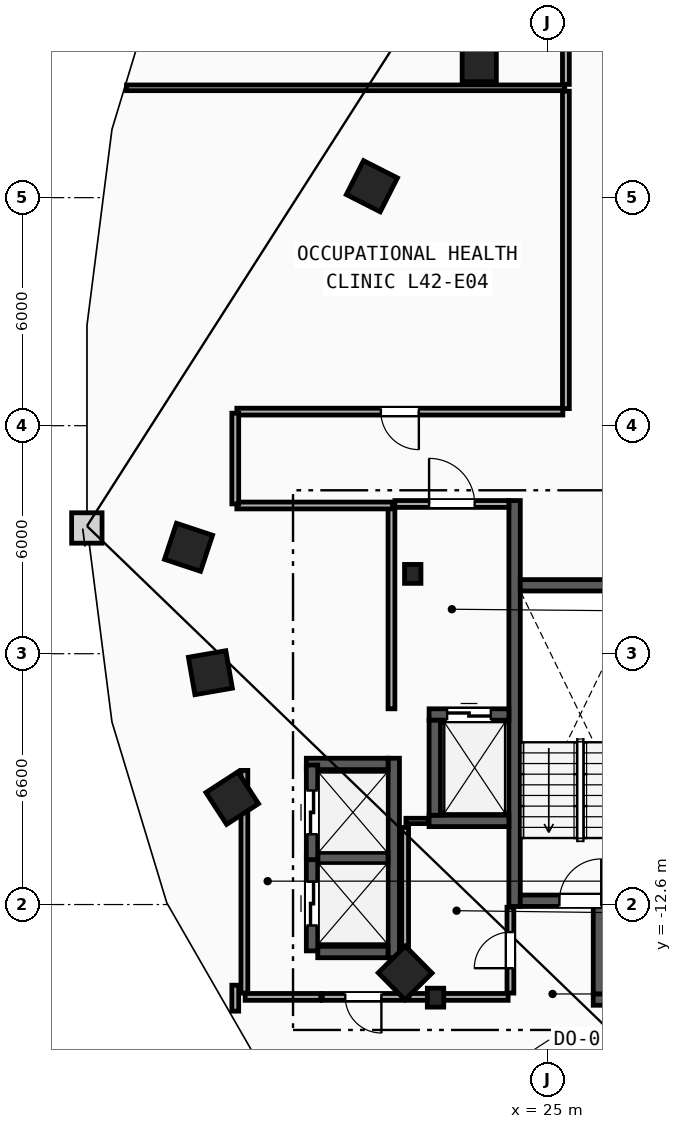
"""IFC4 building model, lengths in metres.
Left out: names, types, materials, properties, quantities, classifications, styles, units other than length and angle.
Written with IfcOpenShell. Run it as: python <this file> out.ifc"""

import sys

from ifc_helpers import new_model, si_unit, direction, frame, frame_2d, origin, origin_2d, place, context, subcontext, project, spatial, rectangle, i_section, extrude, element, fill, save


model = new_model("IFC4")
c1 = context("Model", 3, precision=1e-05, world=origin(), true_north=direction((0.0, 1.0)))
c2 = subcontext(c1, "Body", "Model", "MODEL_VIEW")
j1 = project(units=[si_unit("LENGTHUNIT", "METRE"), si_unit("PLANEANGLEUNIT", "RADIAN")], contexts=[c1])
p1 = place(None, origin())
s1 = spatial("IfcSite", under=j1, at=p1, CompositionType="ELEMENT")
p2 = place(p1, origin())
s2 = spatial("IfcBuilding", under=s1, at=p2, CompositionType="ELEMENT")
p3 = place(p2, frame((0.0, 0.0, 162.0)))
s3 = spatial("IfcBuildingStorey", under=s2, at=p3, CompositionType="ELEMENT", Elevation=162.0)
for number, where, z_axis, x_axis in (
    (1, (21.45, -3.9, 0.0), (0.0, 0.0, 1.0), (1.0, 0.0, 0.0)),
    (2, (22.05, -15.05, 0.0), (0.0, 0.0, 1.0), (1.0, 0.0, 0.0)),
):
    element("IfcColumn", number, at=place(p3, frame(where, z_axis=z_axis, x_axis=x_axis)), inside=s3, PredefinedType="COLUMN", context=c2, shape_type="SweptSolid", body=[
        extrude(i_section(OverallWidth=0.432, OverallDepth=0.498, WebThickness=0.056, FlangeThickness=0.089, FilletRadius=0.018, at=origin_2d()), origin(), (0.0, 0.0, 1.0), 3.6),
    ])
p4 = place(p3, frame((23.2, 9.5, 0.0), z_axis=(0.0, 0.0, 1.0), x_axis=(1.0, 0.0, 0.0)))
e3 = element("IfcColumn", 3, at=p4, inside=s3, PredefinedType="COLUMN", context=c2, shape_type="SweptSolid", body=[
    extrude(rectangle(XDim=0.9, YDim=0.9, at=origin_2d()), origin(), (0.0, 0.0, 1.0), 3.6),
])
for number, where, z_axis, x_axis in (
    (4, (15.55, -3.2, 0.0), (0.0, 0.0, 1.0), (-0.315, -0.949, 0.0)),
    (5, (16.125, -6.5, 0.0), (0.0, 0.0, 1.0), (0.172, -0.985, 0.0)),
    (6, (16.7, -9.8, 0.0), (0.0, 0.0, 1.0), (0.544, -0.839, 0.0)),
    (7, (21.25, -14.4, 0.0), (0.0, 0.0, 1.0), (0.703, -0.711, 0.0)),
    (8, (20.375, 6.3, 0.0), (0.0, 0.0, 1.0), (-0.453, -0.892, 0.0)),
):
    element("IfcColumn", number, at=place(p3, frame(where, z_axis=z_axis, x_axis=x_axis)), inside=s3, PredefinedType="COLUMN", context=c2, shape_type="SweptSolid", body=[
        extrude(rectangle(XDim=1.0, YDim=1.0, at=origin_2d()), origin(), (0.0, 0.0, 1.0), 3.6),
    ])
p5 = place(p3, frame((24.13, -12.65, 0.0), z_axis=(0.0, 0.0, 1.0), x_axis=(0.0, 1.0, 0.0)))
e9 = element("IfcWall", 9, at=p5, inside=s3, PredefinedType="SHEAR", context=c2, shape_type="SweptSolid", body=[
    extrude(rectangle(XDim=10.68, YDim=0.3, at=frame_2d((5.34, 0.0))), origin(), (0.0, 0.0, 1.0), 3.36),
])
p6 = place(p3, frame((24.28, -12.5, 0.0), z_axis=(0.0, 0.0, 1.0), x_axis=(1.0, 0.0, 0.0)))
e10 = element("IfcWall", 10, at=p6, inside=s3, PredefinedType="SHEAR", context=c2, shape_type="SweptSolid", body=[
    extrude(rectangle(XDim=3.16, YDim=0.3, at=frame_2d((1.58, 0.0))), origin(), (0.0, 0.0, 1.0), 3.36),
])
p7 = place(p6, frame((1.03, 0.0, 0.0)))
e11 = element("IfcOpeningElement", 11, at=p7, cuts=e10, PredefinedType="OPENING", context=c2, shape_type="SweptSolid", body=[
    extrude(rectangle(XDim=1.1, YDim=2.15, at=frame_2d((0.55, 1.075))), frame((0.0, 0.16, 0.0), z_axis=(0.0, -1.0, 0.0), x_axis=(1.0, 0.0, 0.0)), (0.0, 0.0, 1.0), 0.32),
])
p8 = place(p3, frame((24.28, -4.2, 0.0), z_axis=(0.0, 0.0, 1.0), x_axis=(1.0, 0.0, 0.0)))
e12 = element("IfcWall", 12, at=p8, inside=s3, PredefinedType="SHEAR", context=c2, shape_type="SweptSolid", body=[
    extrude(rectangle(XDim=3.16, YDim=0.3, at=frame_2d((1.58, 0.0))), origin(), (0.0, 0.0, 1.0), 3.36),
])
p9 = place(p3, frame((20.89, -7.45, 0.0), z_axis=(0.0, 0.0, 1.0), x_axis=(0.0, 1.0, 0.0)))
e13 = element("IfcWall", 13, at=p9, inside=s3, PredefinedType="PARTITIONING", context=c2, shape_type="SweptSolid", body=[
    extrude(rectangle(XDim=5.3, YDim=0.18, at=frame_2d((2.65, 0.0))), origin(), (0.0, 0.0, 1.0), 3.36),
])
p10 = place(p3, frame((20.98, -2.06, 0.0), z_axis=(0.0, 0.0, 1.0), x_axis=(1.0, 0.0, 0.0)))
e14 = element("IfcWall", 14, at=p10, inside=s3, PredefinedType="PARTITIONING", context=c2, shape_type="SweptSolid", body=[
    extrude(rectangle(XDim=3.0, YDim=0.18, at=frame_2d((1.5, 0.0))), origin(), (0.0, 0.0, 1.0), 3.36),
])
p11 = place(p10, frame((0.9, 0.0, 0.0)))
e15 = element("IfcOpeningElement", 15, at=p11, cuts=e14, PredefinedType="OPENING", context=c2, shape_type="SweptSolid", body=[
    extrude(rectangle(XDim=1.2, YDim=2.15, at=frame_2d((0.6, 1.075))), frame((0.0, 0.1, 0.0), z_axis=(0.0, -1.0, 0.0), x_axis=(1.0, 0.0, 0.0)), (0.0, 0.0, 1.0), 0.2),
])
p12 = place(p3, frame((21.88, -7.6, 0.0), z_axis=(0.0, 0.0, 1.0), x_axis=(1.0, 0.0, 0.0)))
e16 = element("IfcWall", 16, at=p12, inside=s3, PredefinedType="SHEAR", context=c2, shape_type="SweptSolid", body=[
    extrude(rectangle(XDim=2.1, YDim=0.3, at=frame_2d((1.05, 0.0))), origin(), (0.0, 0.0, 1.0), 3.36),
])
p13 = place(p12, frame((0.475, 0.0, 0.0)))
e17 = element("IfcOpeningElement", 17, at=p13, cuts=e16, PredefinedType="OPENING", context=c2, shape_type="SweptSolid", body=[
    extrude(rectangle(XDim=1.15, YDim=2.2, at=frame_2d((0.575, 1.1))), frame((0.0, 0.16, 0.0), z_axis=(0.0, -1.0, 0.0), x_axis=(1.0, 0.0, 0.0)), (0.0, 0.0, 1.0), 0.32),
])
p14 = place(p3, frame((21.88, -10.4, 0.0), z_axis=(0.0, 0.0, 1.0), x_axis=(1.0, 0.0, 0.0)))
e18 = element("IfcWall", 18, at=p14, inside=s3, PredefinedType="SHEAR", context=c2, shape_type="SweptSolid", body=[
    extrude(rectangle(XDim=2.1, YDim=0.3, at=frame_2d((1.05, 0.0))), origin(), (0.0, 0.0, 1.0), 3.36),
])
for number, where, z_axis, x_axis in (
    (19, (22.03, -10.25, 0.0), (0.0, 0.0, 1.0), (0.0, 1.0, 0.0)),
    (20, (26.2, -15.1, 0.0), (0.0, 0.0, 1.0), (1.0, 0.0, 0.0)),
):
    element("IfcWall", number, at=place(p3, frame(where, z_axis=z_axis, x_axis=x_axis)), inside=s3, PredefinedType="SHEAR", context=c2, shape_type="SweptSolid", body=[
        extrude(rectangle(XDim=2.5, YDim=0.3, at=frame_2d((1.25, 0.0))), origin(), (0.0, 0.0, 1.0), 3.36),
    ])
p15 = place(p3, frame((26.35, -14.95, 0.0), z_axis=(0.0, 0.0, 1.0), x_axis=(0.0, 1.0, 0.0)))
e21 = element("IfcWall", 21, at=p15, inside=s3, PredefinedType="SHEAR", context=c2, shape_type="SweptSolid", body=[
    extrude(rectangle(XDim=2.3, YDim=0.3, at=frame_2d((1.15, 0.0))), origin(), (0.0, 0.0, 1.0), 3.36),
])
p16 = place(p3, frame((20.95, -14.0, 0.0), z_axis=(0.0, 0.0, 1.0), x_axis=(0.0, 1.0, 0.0)))
e22 = element("IfcWall", 22, at=p16, inside=s3, PredefinedType="SHEAR", context=c2, shape_type="SweptSolid", body=[
    extrude(rectangle(XDim=5.25, YDim=0.3, at=frame_2d((2.625, 0.0))), origin(), (0.0, 0.0, 1.0), 3.36),
])
p17 = place(p3, frame((18.95, -13.85, 0.0), z_axis=(0.0, 0.0, 1.0), x_axis=(1.0, 0.0, 0.0)))
e23 = element("IfcWall", 23, at=p17, inside=s3, PredefinedType="SHEAR", context=c2, shape_type="SweptSolid", body=[
    extrude(rectangle(XDim=1.85, YDim=0.3, at=frame_2d((0.925, 0.0))), origin(), (0.0, 0.0, 1.0), 3.36),
])
p18 = place(p3, frame((18.65, -8.9, 0.0), z_axis=(0.0, 0.0, 1.0), x_axis=(1.0, 0.0, 0.0)))
e24 = element("IfcWall", 24, at=p18, inside=s3, PredefinedType="SHEAR", context=c2, shape_type="SweptSolid", body=[
    extrude(rectangle(XDim=2.15, YDim=0.3, at=frame_2d((1.075, 0.0))), origin(), (0.0, 0.0, 1.0), 3.36),
])
p19 = place(p3, frame((18.95, -11.375, 0.0), z_axis=(0.0, 0.0, 1.0), x_axis=(1.0, 0.0, 0.0)))
e25 = element("IfcWall", 25, at=p19, inside=s3, PredefinedType="SHEAR", context=c2, shape_type="SweptSolid", body=[
    extrude(rectangle(XDim=1.85, YDim=0.3, at=frame_2d((0.925, 0.0))), origin(), (0.0, 0.0, 1.0), 3.36),
])
p20 = place(p3, frame((18.8, -13.82, 0.0), z_axis=(0.0, 0.0, 1.0), x_axis=(0.0, 1.0, 0.0)))
e26 = element("IfcWall", 26, at=p20, inside=s3, PredefinedType="SHEAR", context=c2, shape_type="SweptSolid", body=[
    extrude(rectangle(XDim=2.49, YDim=0.3, at=frame_2d((1.245, 0.0))), origin(), (0.0, 0.0, 1.0), 3.36),
])
p21 = place(p20, frame((0.67, 0.0, 0.0)))
e27 = element("IfcOpeningElement", 27, at=p21, cuts=e26, PredefinedType="OPENING", context=c2, shape_type="SweptSolid", body=[
    extrude(rectangle(XDim=1.15, YDim=2.2, at=frame_2d((0.575, 1.1))), frame((0.0, 0.16, 0.0), z_axis=(0.0, -1.0, 0.0), x_axis=(1.0, 0.0, 0.0)), (0.0, 0.0, 1.0), 0.32),
])
p22 = place(p3, frame((18.8, -11.42, 0.0), z_axis=(0.0, 0.0, 1.0), x_axis=(0.0, 1.0, 0.0)))
e28 = element("IfcWall", 28, at=p22, inside=s3, PredefinedType="SHEAR", context=c2, shape_type="SweptSolid", body=[
    extrude(rectangle(XDim=2.49, YDim=0.3, at=frame_2d((1.245, 0.0))), origin(), (0.0, 0.0, 1.0), 3.36),
])
p23 = place(p22, frame((0.67, 0.0, 0.0)))
e29 = element("IfcOpeningElement", 29, at=p23, cuts=e28, PredefinedType="OPENING", context=c2, shape_type="SweptSolid", body=[
    extrude(rectangle(XDim=1.15, YDim=2.2, at=frame_2d((0.575, 1.1))), frame((0.0, 0.16, 0.0), z_axis=(0.0, -1.0, 0.0), x_axis=(1.0, 0.0, 0.0)), (0.0, 0.0, 1.0), 0.32),
])
p24 = place(p3, frame((17.02, -14.93, 0.0), z_axis=(0.0, 0.0, 1.0), x_axis=(0.0, 1.0, 0.0)))
e30 = element("IfcWall", 30, at=p24, inside=s3, PredefinedType="PARTITIONING", context=c2, shape_type="SweptSolid", body=[
    extrude(rectangle(XDim=5.86, YDim=0.18, at=frame_2d((2.93, 0.0))), origin(), (0.0, 0.0, 1.0), 3.36),
])
p25 = place(p3, frame((17.04, -15.03, 0.0), z_axis=(0.0, 0.0, 1.0), x_axis=(1.0, 0.0, 0.0)))
e31 = element("IfcWall", 31, at=p25, inside=s3, PredefinedType="PARTITIONING", context=c2, shape_type="SweptSolid", body=[
    extrude(rectangle(XDim=1.99, YDim=0.18, at=frame_2d((0.995, 0.0))), origin(), (0.0, 0.0, 1.0), 3.36),
])
p26 = place(p3, frame((21.23, -15.03, 0.0), z_axis=(0.0, 0.0, 1.0), x_axis=(-1.0, 0.0, 0.0)))
e32 = element("IfcWall", 32, at=p26, inside=s3, PredefinedType="PARTITIONING", context=c2, shape_type="SweptSolid", body=[
    extrude(rectangle(XDim=2.16, YDim=0.18, at=frame_2d((1.08, 0.0))), origin(), (0.0, 0.0, 1.0), 3.36),
])
p27 = place(p26, frame((0.605, 0.0, 0.0)))
e33 = element("IfcOpeningElement", 33, at=p27, cuts=e32, PredefinedType="OPENING", context=c2, shape_type="SweptSolid", body=[
    extrude(rectangle(XDim=0.95, YDim=2.1, at=frame_2d((0.475, 1.05))), frame((0.0, 0.1, 0.0), z_axis=(0.0, -1.0, 0.0), x_axis=(1.0, 0.0, 0.0)), (0.0, 0.0, 1.0), 0.2),
])
p28 = place(p3, frame((21.27, -10.4, 0.0), z_axis=(0.0, 0.0, 1.0), x_axis=(1.0, 0.0, 0.0)))
e34 = element("IfcWall", 34, at=p28, inside=s3, PredefinedType="PARTITIONING", context=c2, shape_type="SweptSolid", body=[
    extrude(rectangle(XDim=0.59, YDim=0.14, at=frame_2d((0.295, 0.0))), origin(), (0.0, 0.0, 1.0), 3.36),
])
p29 = place(p3, frame((21.25, -14.93, 0.0), z_axis=(0.0, 0.0, 1.0), x_axis=(0.0, 1.0, 0.0)))
e35 = element("IfcWall", 35, at=p29, inside=s3, PredefinedType="PARTITIONING", context=c2, shape_type="SweptSolid", body=[
    extrude(rectangle(XDim=4.36, YDim=0.18, at=frame_2d((2.18, 0.0))), origin(), (0.0, 0.0, 1.0), 3.36),
])
p30 = place(p3, frame((21.35, -15.03, 0.0), z_axis=(0.0, 0.0, 1.0), x_axis=(1.0, 0.0, 0.0)))
e36 = element("IfcWall", 36, at=p30, inside=s3, PredefinedType="PARTITIONING", context=c2, shape_type="SweptSolid", body=[
    extrude(rectangle(XDim=2.61, YDim=0.18, at=frame_2d((1.305, 0.0))), origin(), (0.0, 0.0, 1.0), 2.433),
])
p31 = place(p3, frame((24.02, -14.93, 0.0), z_axis=(0.0, 0.0, 1.0), x_axis=(0.0, 1.0, 0.0)))
e37 = element("IfcWall", 37, at=p31, inside=s3, PredefinedType="PARTITIONING", context=c2, shape_type="SweptSolid", body=[
    extrude(rectangle(XDim=2.26, YDim=0.18, at=frame_2d((1.13, 0.0))), origin(), (0.0, 0.0, 1.0), 3.36),
])
p32 = place(p31, frame((0.655, 0.0, 0.0)))
e38 = element("IfcOpeningElement", 38, at=p32, cuts=e37, PredefinedType="OPENING", context=c2, shape_type="SweptSolid", body=[
    extrude(rectangle(XDim=0.95, YDim=2.1, at=frame_2d((0.475, 1.05))), frame((0.0, 0.1, 0.0), z_axis=(0.0, -1.0, 0.0), x_axis=(1.0, 0.0, 0.0)), (0.0, 0.0, 1.0), 0.2),
])
p33 = place(p3, frame((13.918, 8.89, 0.0), z_axis=(0.0, 0.0, 1.0), x_axis=(1.0, 0.0, 0.0)))
e39 = element("IfcWall", 39, at=p33, inside=s3, PredefinedType="PARTITIONING", context=c2, shape_type="SweptSolid", body=[
    extrude(rectangle(XDim=11.532, YDim=0.15, at=frame_2d((5.766, 0.0))), origin(), (0.0, 0.0, 1.0), 3.36),
])
p34 = place(p3, frame((25.4, 0.37, 0.0), z_axis=(0.0, 0.0, 1.0), x_axis=(-1.0, 0.0, 0.0)))
e40 = element("IfcWall", 40, at=p34, inside=s3, PredefinedType="PARTITIONING", context=c2, shape_type="SweptSolid", body=[
    extrude(rectangle(XDim=8.578, YDim=0.18, at=frame_2d((4.289, 0.0))), origin(), (0.0, 0.0, 1.0), 3.36),
])
p35 = place(p34, frame((3.789, 0.0, 0.0)))
e41 = element("IfcOpeningElement", 41, at=p35, cuts=e40, PredefinedType="OPENING", context=c2, shape_type="SweptSolid", body=[
    extrude(rectangle(XDim=1.0, YDim=2.15, at=frame_2d((0.5, 1.075))), frame((0.0, 0.1, 0.0), z_axis=(0.0, -1.0, 0.0), x_axis=(1.0, 0.0, 0.0)), (0.0, 0.0, 1.0), 0.2),
])
p36 = place(p3, frame((25.48, 8.8, 0.0), z_axis=(0.0, 0.0, 1.0), x_axis=(0.0, -1.0, 0.0)))
e42 = element("IfcWall", 42, at=p36, inside=s3, PredefinedType="PARTITIONING", context=c2, shape_type="SweptSolid", body=[
    extrude(rectangle(XDim=8.35, YDim=0.18, at=frame_2d((4.175, 0.0))), origin(), (0.0, 0.0, 1.0), 3.36),
])
p37 = place(p3, frame((16.822, -2.1, 0.0), z_axis=(0.0, 0.0, 1.0), x_axis=(1.0, 0.0, 0.0)))
e43 = element("IfcWall", 43, at=p37, inside=s3, PredefinedType="PARTITIONING", context=c2, shape_type="SweptSolid", body=[
    extrude(rectangle(XDim=4.098, YDim=0.18, at=frame_2d((2.049, 0.0))), origin(), (0.0, 0.0, 1.0), 3.36),
])
p38 = place(p3, frame((16.78, 0.329, 0.0), z_axis=(0.0, 0.0, 1.0), x_axis=(0.0, -1.0, 0.0)))
e44 = element("IfcWall", 44, at=p38, inside=s3, PredefinedType="PARTITIONING", context=c2, shape_type="SweptSolid", body=[
    extrude(rectangle(XDim=2.387, YDim=0.18, at=frame_2d((1.194, 0.0))), origin(), (0.0, 0.0, 1.0), 3.36),
])
p39 = place(p3, frame((16.78, -14.721, 0.0), z_axis=(0.0, 0.0, 1.0), x_axis=(0.0, -1.0, 0.0)))
e45 = element("IfcWall", 45, at=p39, inside=s3, PredefinedType="PARTITIONING", context=c2, shape_type="SweptSolid", body=[
    extrude(rectangle(XDim=0.684, YDim=0.18, at=frame_2d((0.342, 0.0))), origin(), (0.0, 0.0, 1.0), 3.36),
])
p40 = place(p3, frame((25.48, 11.178, 0.0), z_axis=(0.0, 0.0, 1.0), x_axis=(0.0, -1.0, 0.0)))
e46 = element("IfcWall", 46, at=p40, inside=s3, PredefinedType="PARTITIONING", context=c2, shape_type="SweptSolid", body=[
    extrude(rectangle(XDim=2.198, YDim=0.18, at=frame_2d((1.099, 0.0))), origin(), (0.0, 0.0, 1.0), 3.36),
])
p41 = place(p7, origin())
e47 = element("IfcDoor", 47, at=p41, inside=s3, OperationType="SINGLE_SWING_RIGHT", PredefinedType="DOOR", context=c2, shape_type="SweptSolid", body=[
    extrude(rectangle(XDim=1.1, YDim=2.15, at=frame_2d((0.55, 1.075))), frame((0.0, 0.025, 0.0), z_axis=(0.0, -1.0, 0.0), x_axis=(1.0, 0.0, 0.0)), (0.0, 0.0, 1.0), 0.05),
])
fill(e11, e47)
p42 = place(p11, origin())
e48 = element("IfcDoor", 48, at=p42, inside=s3, OperationType="SINGLE_SWING_LEFT", PredefinedType="DOOR", context=c2, shape_type="SweptSolid", body=[
    extrude(rectangle(XDim=1.2, YDim=2.15, at=frame_2d((0.6, 1.075))), frame((0.0, 0.025, 0.0), z_axis=(0.0, -1.0, 0.0), x_axis=(1.0, 0.0, 0.0)), (0.0, 0.0, 1.0), 0.05),
])
fill(e15, e48)
p43 = place(p13, origin())
e49 = element("IfcDoor", 49, at=p43, inside=s3, OperationType="SLIDING_TO_LEFT", PredefinedType="TRAPDOOR", context=c2, shape_type="SweptSolid", body=[
    extrude(rectangle(XDim=1.15, YDim=2.2, at=frame_2d((0.575, 1.1))), frame((0.0, 0.025, 0.0), z_axis=(0.0, -1.0, 0.0), x_axis=(1.0, 0.0, 0.0)), (0.0, 0.0, 1.0), 0.05),
])
fill(e17, e49)
p44 = place(p21, origin())
e50 = element("IfcDoor", 50, at=p44, inside=s3, OperationType="SLIDING_TO_LEFT", PredefinedType="TRAPDOOR", context=c2, shape_type="SweptSolid", body=[
    extrude(rectangle(XDim=1.15, YDim=2.2, at=frame_2d((0.575, 1.1))), frame((0.0, 0.025, 0.0), z_axis=(0.0, -1.0, 0.0), x_axis=(1.0, 0.0, 0.0)), (0.0, 0.0, 1.0), 0.05),
])
fill(e27, e50)
p45 = place(p23, origin())
e51 = element("IfcDoor", 51, at=p45, inside=s3, OperationType="SLIDING_TO_LEFT", PredefinedType="TRAPDOOR", context=c2, shape_type="SweptSolid", body=[
    extrude(rectangle(XDim=1.15, YDim=2.2, at=frame_2d((0.575, 1.1))), frame((0.0, 0.025, 0.0), z_axis=(0.0, -1.0, 0.0), x_axis=(1.0, 0.0, 0.0)), (0.0, 0.0, 1.0), 0.05),
])
fill(e29, e51)
p46 = place(p35, origin())
e52 = element("IfcDoor", 52, at=p46, inside=s3, OperationType="SINGLE_SWING_LEFT", PredefinedType="DOOR", context=c2, shape_type="SweptSolid", body=[
    extrude(rectangle(XDim=1.0, YDim=2.15, at=frame_2d((0.5, 1.075))), frame((0.0, 0.025, 0.0), z_axis=(0.0, -1.0, 0.0), x_axis=(1.0, 0.0, 0.0)), (0.0, 0.0, 1.0), 0.05),
])
fill(e41, e52)
p47 = place(p32, origin())
e53 = element("IfcDoor", 53, at=p47, inside=s3, OperationType="SINGLE_SWING_LEFT", PredefinedType="DOOR", context=c2, shape_type="SweptSolid", body=[
    extrude(rectangle(XDim=0.95, YDim=2.1, at=frame_2d((0.475, 1.05))), frame((0.0, 0.025, 0.0), z_axis=(0.0, -1.0, 0.0), x_axis=(1.0, 0.0, 0.0)), (0.0, 0.0, 1.0), 0.05),
])
fill(e38, e53)
p48 = place(p27, origin())
e54 = element("IfcDoor", 54, at=p48, inside=s3, OperationType="SINGLE_SWING_LEFT", PredefinedType="DOOR", context=c2, shape_type="SweptSolid", body=[
    extrude(rectangle(XDim=0.95, YDim=2.1, at=frame_2d((0.475, 1.05))), frame((0.0, 0.025, 0.0), z_axis=(0.0, -1.0, 0.0), x_axis=(1.0, 0.0, 0.0)), (0.0, 0.0, 1.0), 0.05),
])
fill(e33, e54)
save(model, sys.argv[1])
